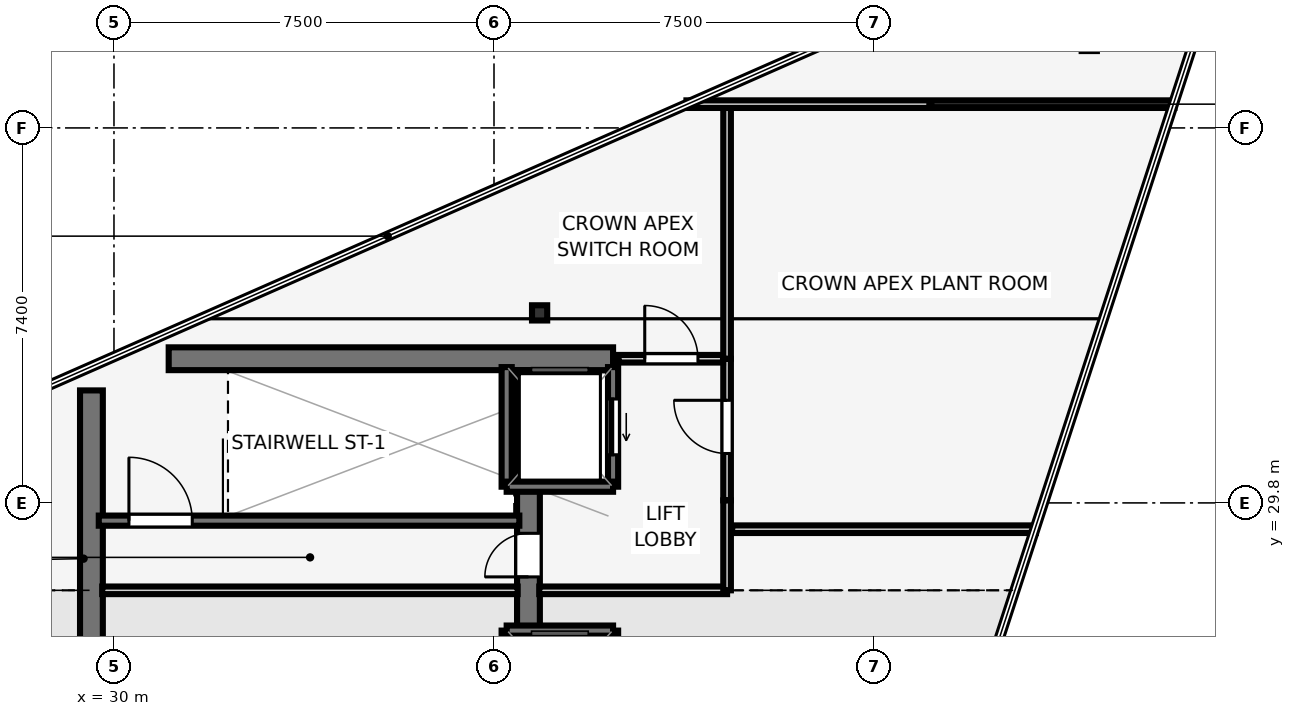
"""IFC4 building model, lengths in metres.
Left out: names, types, materials, properties, quantities, classifications, styles, units other than length and angle.
Written with IfcOpenShell. Run it as: python <this file> out.ifc"""

import sys

from ifc_helpers import new_model, si_unit, direction, frame, frame_2d, origin, origin_2d, place, context, subcontext, project, spatial, rectangle, i_section, extrude, element, fill, save


model = new_model("IFC4")
c1 = context("Model", 3, precision=1e-05, world=origin(), true_north=direction((0.0, 1.0)))
c2 = subcontext(c1, "Body", "Model", "MODEL_VIEW")
j1 = project(units=[si_unit("LENGTHUNIT", "METRE"), si_unit("PLANEANGLEUNIT", "RADIAN")], contexts=[c1])
p1 = place(None, origin())
s1 = spatial("IfcSite", under=j1, at=p1, CompositionType="ELEMENT")
p2 = place(p1, origin())
s2 = spatial("IfcBuilding", under=s1, at=p2, CompositionType="ELEMENT")
p3 = place(p2, frame((0.0, 0.0, 375.05)))
s3 = spatial("IfcBuildingStorey", under=s2, at=p3, CompositionType="ELEMENT", Elevation=375.05)
p4 = place(p3, frame((31.08, 32.645, 0.0), z_axis=(0.0, 0.0, 1.0), x_axis=(1.0, 0.0, 0.0)))
e1 = element("IfcWall", 1, at=p4, inside=s3, PredefinedType="SHEAR", context=c2, shape_type="SweptSolid", body=[
    extrude(rectangle(XDim=8.77, YDim=0.45, at=frame_2d((4.385, 0.0))), origin(), (0.0, 0.0, 1.0), 2.3),
])
p5 = place(p3, frame((29.555, 24.98, 0.0), z_axis=(0.0, 0.0, 1.0), x_axis=(0.0, 1.0, 0.0)))
e2 = element("IfcWall", 2, at=p5, inside=s3, PredefinedType="SHEAR", context=c2, shape_type="SweptSolid", body=[
    extrude(rectangle(XDim=7.04, YDim=0.45, at=frame_2d((3.52, 0.0))), origin(), (0.0, 0.0, 1.0), 2.3),
])
p6 = place(p3, frame((38.18, 24.98, 0.0), z_axis=(0.0, 0.0, 1.0), x_axis=(0.0, 1.0, 0.0)))
e3 = element("IfcWall", 3, at=p6, inside=s3, PredefinedType="SHEAR", context=c2, shape_type="SweptSolid", body=[
    extrude(rectangle(XDim=7.44, YDim=0.45, at=frame_2d((3.72, 0.0))), origin(), (0.0, 0.0, 1.0), 2.3),
])
p7 = place(p6, frame((3.36, 0.0, 0.0)))
e4 = element("IfcOpeningElement", 4, at=p7, cuts=e3, PredefinedType="OPENING", context=c2, shape_type="SweptSolid", body=[
    extrude(rectangle(XDim=0.86, YDim=2.05, at=frame_2d((0.43, 1.025))), frame((0.0, 0.235, 0.0), z_axis=(0.0, -1.0, 0.0), x_axis=(1.0, 0.0, 0.0)), (0.0, 0.0, 1.0), 0.47),
])
p8 = place(p3, frame((38.4, 33.55, 0.0), z_axis=(0.0, 0.0, 1.0), x_axis=(1.0, 0.0, 0.0)))
e5 = element("IfcColumn", 5, at=p8, inside=s3, PredefinedType="COLUMN", context=c2, shape_type="SweptSolid", body=[
    extrude(i_section(OverallWidth=0.3, OverallDepth=0.3, WebThickness=0.01, FlangeThickness=0.015, at=origin_2d()), origin(), (0.0, 0.0, 1.0), 3.479),
])
p9 = place(p3, frame((29.7, 29.45, 0.0), z_axis=(0.0, 0.0, 1.0), x_axis=(1.0, 0.0, 0.0)))
e6 = element("IfcWall", 6, at=p9, inside=s3, PredefinedType="SOLIDWALL", context=c2, shape_type="SweptSolid", body=[
    extrude(rectangle(XDim=8.3, YDim=0.2, at=frame_2d((4.15, 0.0))), origin(), (0.0, 0.0, 1.0), 2.4),
])
p10 = place(p9, frame((0.595, 0.0, 0.0)))
e7 = element("IfcOpeningElement", 7, at=p10, cuts=e6, PredefinedType="OPENING", context=c2, shape_type="SweptSolid", body=[
    extrude(rectangle(XDim=1.25, YDim=2.15, at=frame_2d((0.625, 1.075))), frame((0.0, 0.11, 0.0), z_axis=(0.0, -1.0, 0.0), x_axis=(1.0, 0.0, 0.0)), (0.0, 0.0, 1.0), 0.22),
])
p11 = place(p3, frame((39.85, 30.12, 0.0), z_axis=(0.0, 0.0, 1.0), x_axis=(0.0, 1.0, 0.0)))
e8 = element("IfcWall", 8, at=p11, inside=s3, PredefinedType="SOLIDWALL", context=c2, shape_type="SweptSolid", body=[
    extrude(rectangle(XDim=2.36, YDim=0.2, at=frame_2d((1.18, 0.0))), origin(), (0.0, 0.0, 1.0), 2.4),
])
p12 = place(p11, frame((0.63, 0.0, 0.0)))
e9 = element("IfcOpeningElement", 9, at=p12, cuts=e8, PredefinedType="OPENING", context=c2, shape_type="SweptSolid", body=[
    extrude(rectangle(XDim=1.1, YDim=2.15, at=frame_2d((0.55, 1.075))), frame((0.0, 0.11, 0.0), z_axis=(0.0, -1.0, 0.0), x_axis=(1.0, 0.0, 0.0)), (0.0, 0.0, 1.0), 0.22),
])
p13 = place(p3, frame((37.75, 30.12, 0.0), z_axis=(0.0, 0.0, 1.0), x_axis=(0.0, 1.0, 0.0)))
e10 = element("IfcWall", 10, at=p13, inside=s3, PredefinedType="SOLIDWALL", context=c2, shape_type="SweptSolid", body=[
    extrude(rectangle(XDim=2.36, YDim=0.2, at=frame_2d((1.18, 0.0))), origin(), (0.0, 0.0, 1.0), 2.4),
])
p14 = place(p3, frame((37.75, 30.12, 0.0), z_axis=(0.0, 0.0, 1.0), x_axis=(1.0, 0.0, 0.0)))
e11 = element("IfcWall", 11, at=p14, inside=s3, PredefinedType="SOLIDWALL", context=c2, shape_type="SweptSolid", body=[
    extrude(rectangle(XDim=2.1, YDim=0.2, at=frame_2d((1.05, 0.0))), origin(), (0.0, 0.0, 1.0), 2.4),
])
p15 = place(p3, frame((39.85, 24.92, 0.0), z_axis=(0.0, 0.0, 1.0), x_axis=(0.0, 1.0, 0.0)))
e12 = element("IfcWall", 12, at=p15, inside=s3, PredefinedType="SOLIDWALL", context=c2, shape_type="SweptSolid", body=[
    extrude(rectangle(XDim=2.36, YDim=0.2, at=frame_2d((1.18, 0.0))), origin(), (0.0, 0.0, 1.0), 2.4),
])
p16 = place(p15, frame((0.63, 0.0, 0.0)))
e13 = element("IfcOpeningElement", 13, at=p16, cuts=e12, PredefinedType="OPENING", context=c2, shape_type="SweptSolid", body=[
    extrude(rectangle(XDim=1.1, YDim=2.15, at=frame_2d((0.55, 1.075))), frame((0.0, 0.11, 0.0), z_axis=(0.0, -1.0, 0.0), x_axis=(1.0, 0.0, 0.0)), (0.0, 0.0, 1.0), 0.22),
])
p17 = place(p3, frame((37.75, 24.92, 0.0), z_axis=(0.0, 0.0, 1.0), x_axis=(0.0, 1.0, 0.0)))
e14 = element("IfcWall", 14, at=p17, inside=s3, PredefinedType="SOLIDWALL", context=c2, shape_type="SweptSolid", body=[
    extrude(rectangle(XDim=2.36, YDim=0.2, at=frame_2d((1.18, 0.0))), origin(), (0.0, 0.0, 1.0), 2.4),
])
p18 = place(p3, frame((37.75, 27.28, 0.0), z_axis=(0.0, 0.0, 1.0), x_axis=(1.0, 0.0, 0.0)))
e15 = element("IfcWall", 15, at=p18, inside=s3, PredefinedType="SOLIDWALL", context=c2, shape_type="SweptSolid", body=[
    extrude(rectangle(XDim=2.1, YDim=0.2, at=frame_2d((1.05, 0.0))), origin(), (0.0, 0.0, 1.0), 2.4),
])
p19 = place(p3, frame((42.1, 29.85, 0.0), z_axis=(0.0, 0.0, 1.0), x_axis=(0.0, 1.0, 0.0)))
e16 = element("IfcWall", 16, at=p19, inside=s3, PredefinedType="PARTITIONING", context=c2, shape_type="SweptSolid", body=[
    extrude(rectangle(XDim=2.795, YDim=0.15, at=frame_2d((1.397, 0.0))), origin(), (0.0, 0.0, 1.0), 2.35),
])
p20 = place(p19, frame((0.925, 0.0, 0.0)))
e17 = element("IfcOpeningElement", 17, at=p20, cuts=e16, PredefinedType="OPENING", context=c2, shape_type="SweptSolid", body=[
    extrude(rectangle(XDim=1.05, YDim=2.15, at=frame_2d((0.525, 1.075))), frame((0.0, 0.085, 0.0), z_axis=(0.0, -1.0, 0.0), x_axis=(1.0, 0.0, 0.0)), (0.0, 0.0, 1.0), 0.17),
])
p21 = place(p3, frame((39.96, 32.645, 0.0), z_axis=(0.0, 0.0, 1.0), x_axis=(1.0, 0.0, 0.0)))
e18 = element("IfcWall", 18, at=p21, inside=s3, PredefinedType="PARTITIONING", context=c2, shape_type="SweptSolid", body=[
    extrude(rectangle(XDim=2.06, YDim=0.15, at=frame_2d((1.03, 0.0))), origin(), (0.0, 0.0, 1.0), 2.35),
])
p22 = place(p21, frame((0.515, 0.0, 0.0)))
e19 = element("IfcOpeningElement", 19, at=p22, cuts=e18, PredefinedType="OPENING", context=c2, shape_type="SweptSolid", body=[
    extrude(rectangle(XDim=1.05, YDim=2.15, at=frame_2d((0.525, 1.075))), frame((0.0, 0.085, 0.0), z_axis=(0.0, -1.0, 0.0), x_axis=(1.0, 0.0, 0.0)), (0.0, 0.0, 1.0), 0.17),
])
p23 = place(p3, frame((38.393, 28.075, 0.0), z_axis=(0.0, 0.0, 1.0), x_axis=(1.0, 0.0, 0.0)))
e20 = element("IfcWall", 20, at=p23, inside=s3, PredefinedType="PARTITIONING", context=c2, shape_type="SweptSolid", body=[
    extrude(rectangle(XDim=3.707, YDim=0.15, at=frame_2d((1.854, 0.0))), origin(), (0.0, 0.0, 1.0), 2.08),
])
p24 = place(p3, frame((29.768, 28.075, 0.0), z_axis=(0.0, 0.0, 1.0), x_axis=(1.0, 0.0, 0.0)))
e21 = element("IfcWall", 21, at=p24, inside=s3, PredefinedType="PARTITIONING", context=c2, shape_type="SweptSolid", body=[
    extrude(rectangle(XDim=8.199, YDim=0.15, at=frame_2d((4.1, 0.0))), origin(), (0.0, 0.0, 1.0), 2.08),
])
p25 = place(p3, frame((42.1, 28.075, 0.0), z_axis=(0.0, 0.0, 1.0), x_axis=(0.0, 1.0, 0.0)))
e22 = element("IfcWall", 22, at=p25, inside=s3, PredefinedType="PARTITIONING", context=c2, shape_type="SweptSolid", body=[
    extrude(rectangle(XDim=1.775, YDim=0.15, at=frame_2d((0.888, 0.0))), origin(), (0.0, 0.0, 1.0), 2.08),
])
p26 = place(p3, frame((42.1, 32.645, 0.0), z_axis=(0.0, 0.0, 1.0), x_axis=(0.0, 1.0, 0.0)))
e23 = element("IfcWall", 23, at=p26, inside=s3, PredefinedType="PARTITIONING", context=c2, shape_type="SweptSolid", body=[
    extrude(rectangle(XDim=5.055, YDim=0.15, at=frame_2d((2.527, 0.0))), origin(), (0.0, 0.0, 1.0), 2.35),
])
p27 = place(p3, frame((41.298, 37.669, 0.0), z_axis=(0.0, 0.0, 1.0), x_axis=(1.0, 0.0, 0.0)))
e24 = element("IfcWall", 24, at=p27, inside=s3, PredefinedType="PARTITIONING", context=c2, shape_type="SweptSolid", body=[
    extrude(rectangle(XDim=9.63, YDim=0.15, at=frame_2d((4.815, 0.0))), origin(), (0.0, 0.0, 1.0), 2.35),
])
p28 = place(p3, frame((48.195, 29.281, 0.0), z_axis=(0.0, 0.0, 1.0), x_axis=(-1.0, 0.0, 0.0)))
e25 = element("IfcWall", 25, at=p28, inside=s3, PredefinedType="PARTITIONING", context=c2, shape_type="SweptSolid", body=[
    extrude(rectangle(XDim=5.995, YDim=0.15, at=frame_2d((2.997, 0.0))), origin(), (0.0, 0.0, 1.0), 2.35),
])
p29 = place(p10, origin())
e26 = element("IfcDoor", 26, at=p29, inside=s3, OperationType="SINGLE_SWING_LEFT", PredefinedType="DOOR", context=c2, shape_type="SweptSolid", body=[
    extrude(rectangle(XDim=1.25, YDim=2.15, at=frame_2d((0.625, 1.075))), frame((0.0, 0.025, 0.0), z_axis=(0.0, -1.0, 0.0), x_axis=(1.0, 0.0, 0.0)), (0.0, 0.0, 1.0), 0.05),
])
fill(e7, e26)
p30 = place(p12, origin())
e27 = element("IfcDoor", 27, at=p30, inside=s3, OperationType="SLIDING_TO_LEFT", PredefinedType="DOOR", context=c2, shape_type="SweptSolid", body=[
    extrude(rectangle(XDim=1.1, YDim=2.15, at=frame_2d((0.55, 1.075))), frame((0.0, 0.025, 0.0), z_axis=(0.0, -1.0, 0.0), x_axis=(1.0, 0.0, 0.0)), (0.0, 0.0, 1.0), 0.05),
])
fill(e9, e27)
p31 = place(p20, origin())
e28 = element("IfcDoor", 28, at=p31, inside=s3, OperationType="SINGLE_SWING_RIGHT", PredefinedType="DOOR", context=c2, shape_type="SweptSolid", body=[
    extrude(rectangle(XDim=1.05, YDim=2.15, at=frame_2d((0.525, 1.075))), frame((0.0, 0.025, 0.0), z_axis=(0.0, -1.0, 0.0), x_axis=(1.0, 0.0, 0.0)), (0.0, 0.0, 1.0), 0.05),
])
fill(e17, e28)
p32 = place(p22, origin())
e29 = element("IfcDoor", 29, at=p32, inside=s3, OperationType="SINGLE_SWING_LEFT", PredefinedType="DOOR", context=c2, shape_type="SweptSolid", body=[
    extrude(rectangle(XDim=1.05, YDim=2.15, at=frame_2d((0.525, 1.075))), frame((0.0, 0.025, 0.0), z_axis=(0.0, -1.0, 0.0), x_axis=(1.0, 0.0, 0.0)), (0.0, 0.0, 1.0), 0.05),
])
fill(e19, e29)
p33 = place(p7, origin())
e30 = element("IfcDoor", 30, at=p33, inside=s3, OperationType="SINGLE_SWING_LEFT", PredefinedType="DOOR", context=c2, shape_type="SweptSolid", body=[
    extrude(rectangle(XDim=0.86, YDim=2.05, at=frame_2d((0.43, 1.025))), frame((0.0, 0.025, 0.0), z_axis=(0.0, -1.0, 0.0), x_axis=(1.0, 0.0, 0.0)), (0.0, 0.0, 1.0), 0.05),
])
fill(e4, e30)
save(model, sys.argv[1])
